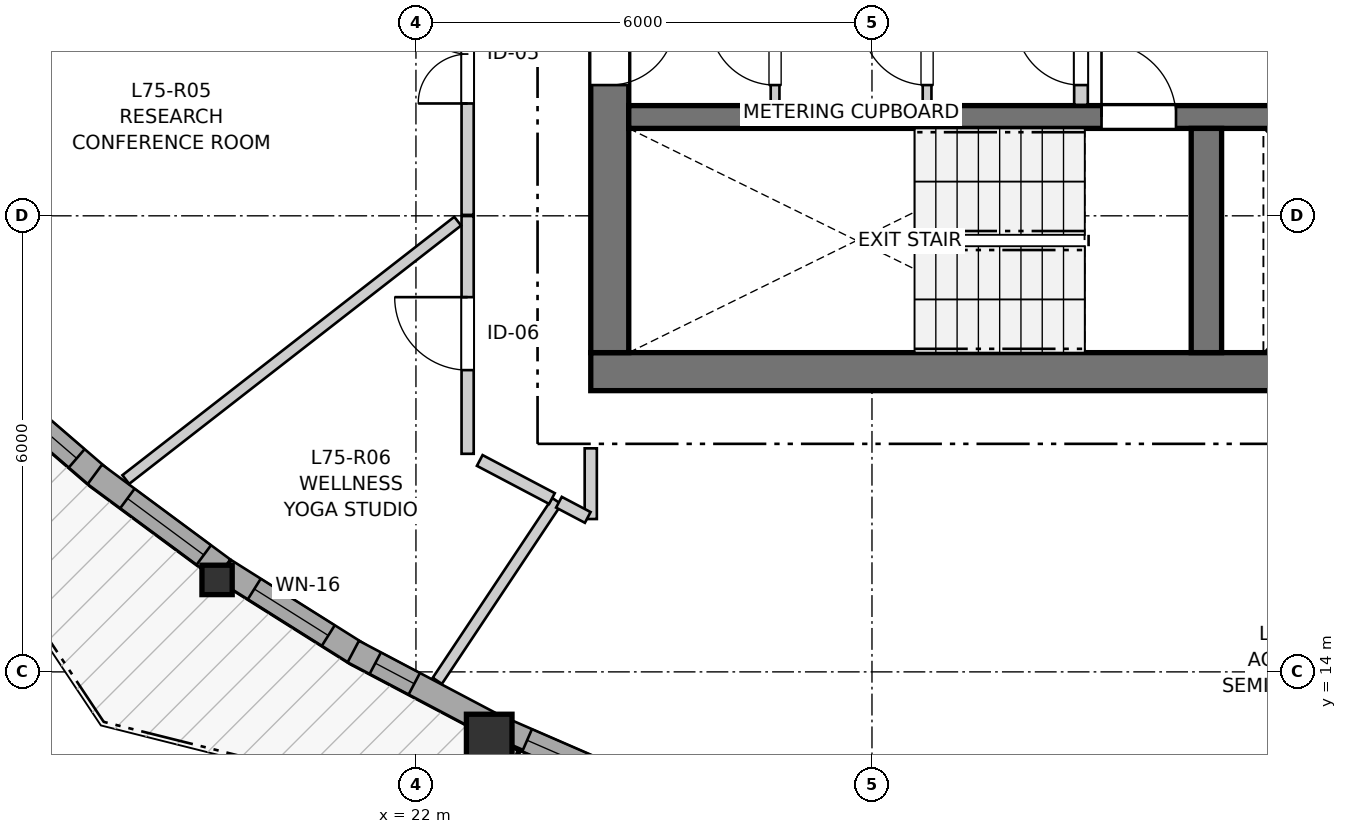
"""IFC4 building model, lengths in metres.
Left out: names, types, materials, properties, quantities, classifications, styles, units other than length and angle.
Written with IfcOpenShell. Run it as: python <this file> out.ifc"""

import sys

from ifc_helpers import new_model, si_unit, direction, frame, frame_2d, origin, origin_2d, place, context, subcontext, project, spatial, rectangle, i_section, extrude, source, transform, mapped, element, fill, save


model = new_model("IFC4")
c1 = context("Model", 3, precision=1e-05, world=origin(), true_north=direction((0.0, 1.0)))
c2 = subcontext(c1, "Body", "Model", "MODEL_VIEW")
j1 = project(units=[si_unit("LENGTHUNIT", "METRE"), si_unit("PLANEANGLEUNIT", "RADIAN")], contexts=[c1])
p1 = place(None, origin())
s1 = spatial("IfcSite", under=j1, at=p1, CompositionType="ELEMENT")
p2 = place(p1, origin())
s2 = spatial("IfcBuilding", under=s1, at=p2, CompositionType="ELEMENT")
p3 = place(p2, frame((0.0, 0.0, 250.0)))
s3 = spatial("IfcBuildingStorey", under=s2, at=p3, CompositionType="ELEMENT", Elevation=250.0)
p4 = place(p3, frame((24.3, 17.95, 0.0), z_axis=(0.0, 0.0, 1.0), x_axis=(1.0, 0.0, 0.0)))
e1 = element("IfcWall", 1, at=p4, inside=s3, PredefinedType="SHEAR", context=c2, shape_type="SweptSolid", body=[
    extrude(rectangle(XDim=12.1, YDim=0.5, at=frame_2d((6.05, 0.0))), origin(), (0.0, 0.0, 1.0), 2.95),
])
p5 = place(p3, frame((24.55, 33.8, 0.0), z_axis=(0.0, 0.0, 1.0), x_axis=(0.0, -1.0, 0.0)))
e2 = element("IfcWall", 2, at=p5, inside=s3, PredefinedType="SHEAR", context=c2, shape_type="SweptSolid", body=[
    extrude(rectangle(XDim=15.6, YDim=0.5, at=frame_2d((7.8, 0.0))), origin(), (0.0, 0.0, 1.0), 2.95),
])
p6 = place(p5, frame((7.05, 0.0, 0.0)))
e3 = element("IfcOpeningElement", 3, at=p6, cuts=e2, PredefinedType="OPENING", context=c2, shape_type="SweptSolid", body=[
    extrude(rectangle(XDim=1.5, YDim=2.15, at=frame_2d((0.75, 1.075))), frame((0.0, 0.26, 0.0), z_axis=(0.0, -1.0, 0.0), x_axis=(1.0, 0.0, 0.0)), (0.0, 0.0, 1.0), 0.52),
])
p7 = place(p5, frame((3.52, 0.0, 0.0)))
e4 = element("IfcOpeningElement", 4, at=p7, cuts=e2, PredefinedType="OPENING", context=c2, shape_type="SweptSolid", body=[
    extrude(rectangle(XDim=0.86, YDim=2.05, at=frame_2d((0.43, 1.025))), frame((0.0, 0.26, 0.0), z_axis=(0.0, -1.0, 0.0), x_axis=(1.0, 0.0, 0.0)), (0.0, 0.0, 1.0), 0.52),
])
p8 = place(p5, frame((11.22, 0.0, 0.0)))
e5 = element("IfcOpeningElement", 5, at=p8, cuts=e2, PredefinedType="OPENING", context=c2, shape_type="SweptSolid", body=[
    extrude(rectangle(XDim=0.86, YDim=2.05, at=frame_2d((0.43, 1.025))), frame((0.0, 0.26, 0.0), z_axis=(0.0, -1.0, 0.0), x_axis=(1.0, 0.0, 0.0)), (0.0, 0.0, 1.0), 0.52),
])
p9 = place(p3, frame((24.8, 21.3, 0.0), z_axis=(0.0, 0.0, 1.0), x_axis=(1.0, 0.0, 0.0)))
e6 = element("IfcWall", 6, at=p9, inside=s3, PredefinedType="SHEAR", context=c2, shape_type="SweptSolid", body=[
    extrude(rectangle(XDim=11.1, YDim=0.3, at=frame_2d((5.55, 0.0))), origin(), (0.0, 0.0, 1.0), 2.95),
])
p10 = place(p9, frame((6.22, 0.0, 0.0)))
e7 = element("IfcOpeningElement", 7, at=p10, cuts=e6, PredefinedType="OPENING", context=c2, shape_type="SweptSolid", body=[
    extrude(rectangle(XDim=0.98, YDim=2.15, at=frame_2d((0.49, 1.075))), frame((0.0, 0.16, 0.0), z_axis=(0.0, -1.0, 0.0), x_axis=(1.0, 0.0, 0.0)), (0.0, 0.0, 1.0), 0.32),
])
p11 = place(p9, frame((9.15, 0.0, 0.0)))
e8 = element("IfcOpeningElement", 8, at=p11, cuts=e6, PredefinedType="OPENING", context=c2, shape_type="SweptSolid", body=[
    extrude(rectangle(XDim=1.15, YDim=2.15, at=frame_2d((0.575, 1.075))), frame((0.0, 0.16, 0.0), z_axis=(0.0, -1.0, 0.0), x_axis=(1.0, 0.0, 0.0)), (0.0, 0.0, 1.0), 0.32),
])
p12 = place(p3, frame((32.4, 18.2, 0.0), z_axis=(0.0, 0.0, 1.0), x_axis=(0.0, 1.0, 0.0)))
e9 = element("IfcWall", 9, at=p12, inside=s3, PredefinedType="SHEAR", context=c2, shape_type="SweptSolid", body=[
    extrude(rectangle(XDim=2.95, YDim=0.4, at=frame_2d((1.475, 0.0))), origin(), (0.0, 0.0, 1.0), 2.95),
])
m1 = source(origin(), c2, "Body", "SweptSolid", [
    extrude(i_section(OverallWidth=0.398, OverallDepth=0.387, WebThickness=0.019, FlangeThickness=0.03, FilletRadius=0.015, at=origin_2d()), origin(), (0.0, 0.0, 1.0), 2.95),
])
p13 = place(p3, frame((19.383, 15.21, 0.0), z_axis=(0.0, 0.0, 1.0), x_axis=(1.0, 0.0, 0.0)))
e10 = element("IfcColumn", 10, at=p13, inside=s3, PredefinedType="PILASTER", context=c2, shape_type="MappedRepresentation", body=[
    mapped(m1, transform((0.0, 0.0, 0.0), x_axis=(1.0, 0.0, 0.0), y_axis=(0.0, 1.0, 0.0), z_axis=(0.0, 0.0, 1.0), scale=1.0)),
])
m2 = source(origin(), c2, "Body", "SweptSolid", [
    extrude(rectangle(XDim=0.6, YDim=0.6, at=origin_2d()), origin(), (0.0, 0.0, 1.0), 2.95),
])
p14 = place(p3, frame((22.964, 13.143, 0.0), z_axis=(0.0, 0.0, 1.0), x_axis=(1.0, 0.0, 0.0)))
e11 = element("IfcColumn", 11, at=p14, inside=s3, PredefinedType="COLUMN", context=c2, shape_type="MappedRepresentation", body=[
    mapped(m2, transform((0.0, 0.0, 0.0), x_axis=(1.0, 0.0, 0.0), y_axis=(0.0, 1.0, 0.0), z_axis=(0.0, 0.0, 1.0), scale=1.0)),
])
p15 = place(p3, frame((16.29, 17.884, 0.0), z_axis=(0.0, 0.0, 1.0), x_axis=(0.757405903716, -0.652944329186, 0.0)))
e12 = element("IfcWall", 12, at=p15, inside=s3, PredefinedType="SOLIDWALL", context=c2, shape_type="SweptSolid", body=[
    extrude(rectangle(XDim=2.052, YDim=0.32, at=frame_2d((1.026, 0.0))), origin(), (0.0, 0.0, 1.0), 2.57),
])
p16 = place(p15, frame((0.396, 0.0, 0.82)))
e13 = element("IfcOpeningElement", 13, at=p16, cuts=e12, PredefinedType="OPENING", context=c2, shape_type="SweptSolid", body=[
    extrude(rectangle(XDim=1.25, YDim=1.35, at=frame_2d((0.625, 0.675))), frame((0.0, 0.17, 0.0), z_axis=(0.0, -1.0, 0.0), x_axis=(1.0, 0.0, 0.0)), (0.0, 0.0, 1.0), 0.34),
])
p17 = place(p3, frame((17.775, 16.599, 0.0), z_axis=(0.0, 0.0, 1.0), x_axis=(0.803808524664, -0.594888103493, 0.0)))
e14 = element("IfcWall", 14, at=p17, inside=s3, PredefinedType="SOLIDWALL", context=c2, shape_type="SweptSolid", body=[
    extrude(rectangle(XDim=2.099, YDim=0.32, at=frame_2d((1.049, 0.0))), origin(), (0.0, 0.0, 1.0), 2.57),
])
p18 = place(p17, frame((0.533, 0.0, 0.82)))
e15 = element("IfcOpeningElement", 15, at=p18, cuts=e14, PredefinedType="OPENING", context=c2, shape_type="SweptSolid", body=[
    extrude(rectangle(XDim=1.25, YDim=1.35, at=frame_2d((0.625, 0.675))), frame((0.0, 0.17, 0.0), z_axis=(0.0, -1.0, 0.0), x_axis=(1.0, 0.0, 0.0)), (0.0, 0.0, 1.0), 0.34),
])
p19 = place(p3, frame((19.486, 15.335, 0.0), z_axis=(0.0, 0.0, 1.0), x_axis=(0.846377392327, -0.532583617621, 0.0)))
e16 = element("IfcWall", 16, at=p19, inside=s3, PredefinedType="SOLIDWALL", context=c2, shape_type="SweptSolid", body=[
    extrude(rectangle(XDim=2.087, YDim=0.32, at=frame_2d((1.043, 0.0))), origin(), (0.0, 0.0, 1.0), 2.57),
])
p20 = place(p19, frame((0.458, 0.0, 0.82)))
e17 = element("IfcOpeningElement", 17, at=p20, cuts=e16, PredefinedType="OPENING", context=c2, shape_type="SweptSolid", body=[
    extrude(rectangle(XDim=1.15, YDim=1.2, at=frame_2d((0.575, 0.6))), frame((0.0, 0.17, 0.0), z_axis=(0.0, -1.0, 0.0), x_axis=(1.0, 0.0, 0.0)), (0.0, 0.0, 1.0), 0.34),
])
p21 = place(p3, frame((21.175, 14.268, 0.0), z_axis=(0.0, 0.0, 1.0), x_axis=(0.88438197682, -0.466763879362, 0.0)))
e18 = element("IfcWall", 18, at=p21, inside=s3, PredefinedType="SOLIDWALL", context=c2, shape_type="SweptSolid", body=[
    extrude(rectangle(XDim=2.017, YDim=0.32, at=frame_2d((1.008, 0.0))), origin(), (0.0, 0.0, 1.0), 2.57),
])
p22 = place(p21, frame((0.327, 0.0, 0.82)))
e19 = element("IfcOpeningElement", 19, at=p22, cuts=e18, PredefinedType="OPENING", context=c2, shape_type="SweptSolid", body=[
    extrude(rectangle(XDim=0.58, YDim=1.35, at=frame_2d((0.29, 0.675))), frame((0.0, 0.17, 0.0), z_axis=(0.0, -1.0, 0.0), x_axis=(1.0, 0.0, 0.0)), (0.0, 0.0, 1.0), 0.34),
])
p23 = place(p3, frame((23.11, 13.254, 0.0), z_axis=(0.0, 0.0, 1.0), x_axis=(0.917071969608, -0.398721710671, 0.0)))
e20 = element("IfcWall", 20, at=p23, inside=s3, PredefinedType="SOLIDWALL", context=c2, shape_type="SweptSolid", body=[
    extrude(rectangle(XDim=2.029, YDim=0.32, at=frame_2d((1.014, 0.0))), origin(), (0.0, 0.0, 1.0), 2.57),
])
p24 = place(p23, frame((0.384, 0.0, 0.82)))
e21 = element("IfcOpeningElement", 21, at=p24, cuts=e20, PredefinedType="OPENING", context=c2, shape_type="SweptSolid", body=[
    extrude(rectangle(XDim=1.25, YDim=1.35, at=frame_2d((0.625, 0.675))), frame((0.0, 0.17, 0.0), z_axis=(0.0, -1.0, 0.0), x_axis=(1.0, 0.0, 0.0)), (0.0, 0.0, 1.0), 0.34),
])
p25 = place(p3, frame((30.75, 21.46, 0.0), z_axis=(0.0, 0.0, 1.0), x_axis=(0.0, 1.0, 0.0)))
e22 = element("IfcWall", 22, at=p25, inside=s3, PredefinedType="PARTITIONING", context=c2, shape_type="SweptSolid", body=[
    extrude(rectangle(XDim=3.11, YDim=0.18, at=frame_2d((1.555, 0.0))), origin(), (0.0, 0.0, 1.0), 2.95),
])
p26 = place(p25, frame((0.26, 0.0, 0.0)))
e23 = element("IfcOpeningElement", 23, at=p26, cuts=e22, PredefinedType="OPENING", context=c2, shape_type="SweptSolid", body=[
    extrude(rectangle(XDim=0.86, YDim=2.05, at=frame_2d((0.43, 1.025))), frame((0.0, 0.1, 0.0), z_axis=(0.0, -1.0, 0.0), x_axis=(1.0, 0.0, 0.0)), (0.0, 0.0, 1.0), 0.2),
])
p27 = place(p3, frame((26.725, 21.46, 0.0), z_axis=(0.0, 0.0, 1.0), x_axis=(0.0, 1.0, 0.0)))
e24 = element("IfcWall", 24, at=p27, inside=s3, PredefinedType="PARTITIONING", context=c2, shape_type="SweptSolid", body=[
    extrude(rectangle(XDim=1.38, YDim=0.115, at=frame_2d((0.69, 0.0))), origin(), (0.0, 0.0, 1.0), 2.95),
])
p28 = place(p27, frame((0.26, 0.0, 0.0)))
e25 = element("IfcOpeningElement", 25, at=p28, cuts=e24, PredefinedType="OPENING", context=c2, shape_type="SweptSolid", body=[
    extrude(rectangle(XDim=0.86, YDim=2.05, at=frame_2d((0.43, 1.025))), frame((0.0, 0.067, 0.0), z_axis=(0.0, -1.0, 0.0), x_axis=(1.0, 0.0, 0.0)), (0.0, 0.0, 1.0), 0.135),
])
p29 = place(p3, frame((28.725, 21.46, 0.0), z_axis=(0.0, 0.0, 1.0), x_axis=(0.0, 1.0, 0.0)))
e26 = element("IfcWall", 26, at=p29, inside=s3, PredefinedType="PARTITIONING", context=c2, shape_type="SweptSolid", body=[
    extrude(rectangle(XDim=1.38, YDim=0.115, at=frame_2d((0.69, 0.0))), origin(), (0.0, 0.0, 1.0), 2.95),
])
p30 = place(p29, frame((0.26, 0.0, 0.0)))
e27 = element("IfcOpeningElement", 27, at=p30, cuts=e26, PredefinedType="OPENING", context=c2, shape_type="SweptSolid", body=[
    extrude(rectangle(XDim=0.86, YDim=2.05, at=frame_2d((0.43, 1.025))), frame((0.0, 0.067, 0.0), z_axis=(0.0, -1.0, 0.0), x_axis=(1.0, 0.0, 0.0)), (0.0, 0.0, 1.0), 0.135),
])
p31 = place(p3, frame((22.68, 20.012, 0.0), z_axis=(0.0, 0.0, 1.0), x_axis=(0.0, 1.0, 0.0)))
e28 = element("IfcWall", 28, at=p31, inside=s3, PredefinedType="PARTITIONING", context=c2, shape_type="SweptSolid", body=[
    extrude(rectangle(XDim=4.138, YDim=0.16, at=frame_2d((2.069, 0.0))), origin(), (0.0, 0.0, 1.0), 2.218),
])
p32 = place(p31, frame((1.466, 0.0, 0.0)))
e29 = element("IfcOpeningElement", 29, at=p32, cuts=e28, PredefinedType="OPENING", context=c2, shape_type="SweptSolid", body=[
    extrude(rectangle(XDim=1.3, YDim=2.1, at=frame_2d((0.65, 1.05))), frame((0.0, 0.09, 0.0), z_axis=(0.0, -1.0, 0.0), x_axis=(1.0, 0.0, 0.0)), (0.0, 0.0, 1.0), 0.18),
])
p33 = place(p3, frame((22.68, 16.869, 0.0), z_axis=(0.0, 0.0, 1.0), x_axis=(0.0, 1.0, 0.0)))
e30 = element("IfcWall", 30, at=p33, inside=s3, PredefinedType="PARTITIONING", context=c2, shape_type="SweptSolid", body=[
    extrude(rectangle(XDim=3.128, YDim=0.16, at=frame_2d((1.564, 0.0))), origin(), (0.0, 0.0, 1.0), 2.95),
])
p34 = place(p33, frame((1.101, 0.0, 0.0)))
e31 = element("IfcOpeningElement", 31, at=p34, cuts=e30, PredefinedType="OPENING", context=c2, shape_type="SweptSolid", body=[
    extrude(rectangle(XDim=0.96, YDim=2.1, at=frame_2d((0.48, 1.05))), frame((0.0, 0.09, 0.0), z_axis=(0.0, -1.0, 0.0), x_axis=(1.0, 0.0, 0.0)), (0.0, 0.0, 1.0), 0.18),
])
p35 = place(p3, frame((18.182, 16.531, 0.0), z_axis=(0.0, 0.0, 1.0), x_axis=(0.789162127136, 0.614184937209, 0.0)))
e32 = element("IfcWall", 32, at=p35, inside=s3, PredefinedType="PARTITIONING", context=c2, shape_type="SweptSolid", body=[
    extrude(rectangle(XDim=5.534, YDim=0.145, at=frame_2d((2.767, 0.0))), origin(), (0.0, 0.0, 1.0), 2.95),
])
p36 = place(p3, frame((22.281, 13.882, 0.0), z_axis=(0.0, 0.0, 1.0), x_axis=(0.554204156683, 0.832380773874, 0.0)))
e33 = element("IfcWall", 33, at=p36, inside=s3, PredefinedType="PARTITIONING", context=c2, shape_type="SweptSolid", body=[
    extrude(rectangle(XDim=2.84, YDim=0.145, at=frame_2d((1.42, 0.0))), origin(), (0.0, 0.0, 1.0), 2.95),
])
p37 = place(p3, frame((22.839, 16.781, 0.0), z_axis=(0.0, 0.0, 1.0), x_axis=(0.884533287542, -0.466477076853, 0.0)))
e34 = element("IfcWall", 34, at=p37, inside=s3, PredefinedType="PARTITIONING", context=c2, shape_type="SweptSolid", body=[
    extrude(rectangle(XDim=1.074, YDim=0.16, at=frame_2d((0.537, 0.0))), origin(), (0.0, 0.0, 1.0), 2.95),
])
p38 = place(p3, frame((24.3, 16.011, 0.0), z_axis=(0.0, 0.0, 1.0), x_axis=(0.0, 1.0, 0.0)))
e35 = element("IfcWall", 35, at=p38, inside=s3, PredefinedType="PARTITIONING", context=c2, shape_type="SweptSolid", body=[
    extrude(rectangle(XDim=0.93, YDim=0.16, at=frame_2d((0.465, 0.0))), origin(), (0.0, 0.0, 1.0), 2.95),
])
p39 = place(p3, frame((23.881, 16.232, 0.0), z_axis=(0.0, 0.0, 1.0), x_axis=(0.884769878191, -0.466028177953, 0.0)))
e36 = element("IfcWall", 36, at=p39, inside=s3, PredefinedType="PARTITIONING", context=c2, shape_type="SweptSolid", body=[
    extrude(rectangle(XDim=0.428, YDim=0.16, at=frame_2d((0.214, 0.0))), origin(), (0.0, 0.0, 1.0), 2.95),
])
m3 = source(origin(), c2, "Body", "SweptSolid", [
    extrude(rectangle(XDim=1.25, YDim=1.35, at=frame_2d((0.625, 0.675))), frame((0.0, 0.03, 0.0), z_axis=(0.0, -1.0, 0.0), x_axis=(1.0, 0.0, 0.0)), (0.0, 0.0, 1.0), 0.06),
])
p40 = place(p16, origin())
e37 = element("IfcWindow", 37, at=p40, inside=s3, PartitioningType="SINGLE_PANEL", PredefinedType="WINDOW", context=c2, shape_type="MappedRepresentation", body=[
    mapped(m3, transform((0.0, 0.0, 0.0), x_axis=(1.0, 0.0, 0.0), y_axis=(0.0, 1.0, 0.0), z_axis=(0.0, 0.0, 1.0), scale=1.0)),
])
fill(e13, e37)
p41 = place(p18, origin())
e38 = element("IfcWindow", 38, at=p41, inside=s3, PartitioningType="SINGLE_PANEL", PredefinedType="WINDOW", context=c2, shape_type="MappedRepresentation", body=[
    mapped(m3, transform((0.0, 0.0, 0.0), x_axis=(1.0, 0.0, 0.0), y_axis=(0.0, 1.0, 0.0), z_axis=(0.0, 0.0, 1.0), scale=1.0)),
])
fill(e15, e38)
m4 = source(origin(), c2, "Body", "SweptSolid", [
    extrude(rectangle(XDim=1.15, YDim=1.2, at=frame_2d((0.575, 0.6))), frame((0.0, 0.03, 0.0), z_axis=(0.0, -1.0, 0.0), x_axis=(1.0, 0.0, 0.0)), (0.0, 0.0, 1.0), 0.06),
])
p42 = place(p20, origin())
e39 = element("IfcWindow", 39, at=p42, inside=s3, PartitioningType="SINGLE_PANEL", PredefinedType="WINDOW", context=c2, shape_type="MappedRepresentation", body=[
    mapped(m4, transform((0.0, 0.0, 0.0), x_axis=(1.0, 0.0, 0.0), y_axis=(0.0, 1.0, 0.0), z_axis=(0.0, 0.0, 1.0), scale=1.0)),
])
fill(e17, e39)
m5 = source(origin(), c2, "Body", "SweptSolid", [
    extrude(rectangle(XDim=0.58, YDim=1.35, at=frame_2d((0.29, 0.675))), frame((0.0, 0.03, 0.0), z_axis=(0.0, -1.0, 0.0), x_axis=(1.0, 0.0, 0.0)), (0.0, 0.0, 1.0), 0.06),
])
p43 = place(p22, origin())
e40 = element("IfcWindow", 40, at=p43, inside=s3, PartitioningType="SINGLE_PANEL", PredefinedType="WINDOW", context=c2, shape_type="MappedRepresentation", body=[
    mapped(m5, transform((0.0, 0.0, 0.0), x_axis=(1.0, 0.0, 0.0), y_axis=(0.0, 1.0, 0.0), z_axis=(0.0, 0.0, 1.0), scale=1.0)),
])
fill(e19, e40)
p44 = place(p24, origin())
e41 = element("IfcWindow", 41, at=p44, inside=s3, PartitioningType="SINGLE_PANEL", PredefinedType="WINDOW", context=c2, shape_type="MappedRepresentation", body=[
    mapped(m3, transform((0.0, 0.0, 0.0), x_axis=(1.0, 0.0, 0.0), y_axis=(0.0, 1.0, 0.0), z_axis=(0.0, 0.0, 1.0), scale=1.0)),
])
fill(e21, e41)
m6 = source(origin(), c2, "Body", "SweptSolid", [
    extrude(rectangle(XDim=0.98, YDim=2.15, at=frame_2d((0.49, 1.075))), frame((0.0, 0.025, 0.0), z_axis=(0.0, -1.0, 0.0), x_axis=(1.0, 0.0, 0.0)), (0.0, 0.0, 1.0), 0.05),
])
p45 = place(p10, origin())
e42 = element("IfcDoor", 42, at=p45, inside=s3, OperationType="SINGLE_SWING_LEFT", PredefinedType="DOOR", context=c2, shape_type="MappedRepresentation", body=[
    mapped(m6, transform((0.0, 0.0, 0.0), x_axis=(1.0, 0.0, 0.0), y_axis=(0.0, 1.0, 0.0), z_axis=(0.0, 0.0, 1.0), scale=1.0)),
])
fill(e7, e42)
m7 = source(origin(), c2, "Body", "SweptSolid", [
    extrude(rectangle(XDim=0.86, YDim=2.05, at=frame_2d((0.43, 1.025))), frame((0.0, 0.025, 0.0), z_axis=(0.0, -1.0, 0.0), x_axis=(1.0, 0.0, 0.0)), (0.0, 0.0, 1.0), 0.05),
])
p46 = place(p8, origin())
e43 = element("IfcDoor", 43, at=p46, inside=s3, OperationType="SINGLE_SWING_LEFT", PredefinedType="DOOR", context=c2, shape_type="MappedRepresentation", body=[
    mapped(m7, transform((0.0, 0.0, 0.0), x_axis=(1.0, 0.0, 0.0), y_axis=(0.0, 1.0, 0.0), z_axis=(0.0, 0.0, 1.0), scale=1.0)),
])
fill(e5, e43)
p47 = place(p26, origin())
e44 = element("IfcDoor", 44, at=p47, inside=s3, OperationType="SINGLE_SWING_RIGHT", PredefinedType="DOOR", context=c2, shape_type="MappedRepresentation", body=[
    mapped(m7, transform((0.0, 0.0, 0.0), x_axis=(1.0, 0.0, 0.0), y_axis=(0.0, 1.0, 0.0), z_axis=(0.0, 0.0, 1.0), scale=1.0)),
])
fill(e23, e44)
p48 = place(p28, origin())
e45 = element("IfcDoor", 45, at=p48, inside=s3, OperationType="SINGLE_SWING_RIGHT", PredefinedType="DOOR", context=c2, shape_type="MappedRepresentation", body=[
    mapped(m7, transform((0.0, 0.0, 0.0), x_axis=(1.0, 0.0, 0.0), y_axis=(0.0, 1.0, 0.0), z_axis=(0.0, 0.0, 1.0), scale=1.0)),
])
fill(e25, e45)
p49 = place(p30, origin())
e46 = element("IfcDoor", 46, at=p49, inside=s3, OperationType="SINGLE_SWING_RIGHT", PredefinedType="DOOR", context=c2, shape_type="MappedRepresentation", body=[
    mapped(m7, transform((0.0, 0.0, 0.0), x_axis=(1.0, 0.0, 0.0), y_axis=(0.0, 1.0, 0.0), z_axis=(0.0, 0.0, 1.0), scale=1.0)),
])
fill(e27, e46)
m8 = source(origin(), c2, "Body", "SweptSolid", [
    extrude(rectangle(XDim=1.3, YDim=2.1, at=frame_2d((0.65, 1.05))), frame((0.0, 0.025, 0.0), z_axis=(0.0, -1.0, 0.0), x_axis=(1.0, 0.0, 0.0)), (0.0, 0.0, 1.0), 0.05),
])
p50 = place(p32, origin())
e47 = element("IfcDoor", 47, at=p50, inside=s3, OperationType="DOUBLE_DOOR_SINGLE_SWING", PredefinedType="DOOR", context=c2, shape_type="MappedRepresentation", body=[
    mapped(m8, transform((0.0, 0.0, 0.0), x_axis=(1.0, 0.0, 0.0), y_axis=(0.0, 1.0, 0.0), z_axis=(0.0, 0.0, 1.0), scale=1.0)),
])
fill(e29, e47)
m9 = source(origin(), c2, "Body", "SweptSolid", [
    extrude(rectangle(XDim=0.96, YDim=2.1, at=frame_2d((0.48, 1.05))), frame((0.0, 0.025, 0.0), z_axis=(0.0, -1.0, 0.0), x_axis=(1.0, 0.0, 0.0)), (0.0, 0.0, 1.0), 0.05),
])
p51 = place(p34, origin())
e48 = element("IfcDoor", 48, at=p51, inside=s3, OperationType="SINGLE_SWING_RIGHT", PredefinedType="DOOR", context=c2, shape_type="MappedRepresentation", body=[
    mapped(m9, transform((0.0, 0.0, 0.0), x_axis=(1.0, 0.0, 0.0), y_axis=(0.0, 1.0, 0.0), z_axis=(0.0, 0.0, 1.0), scale=1.0)),
])
fill(e31, e48)
save(model, sys.argv[1])
